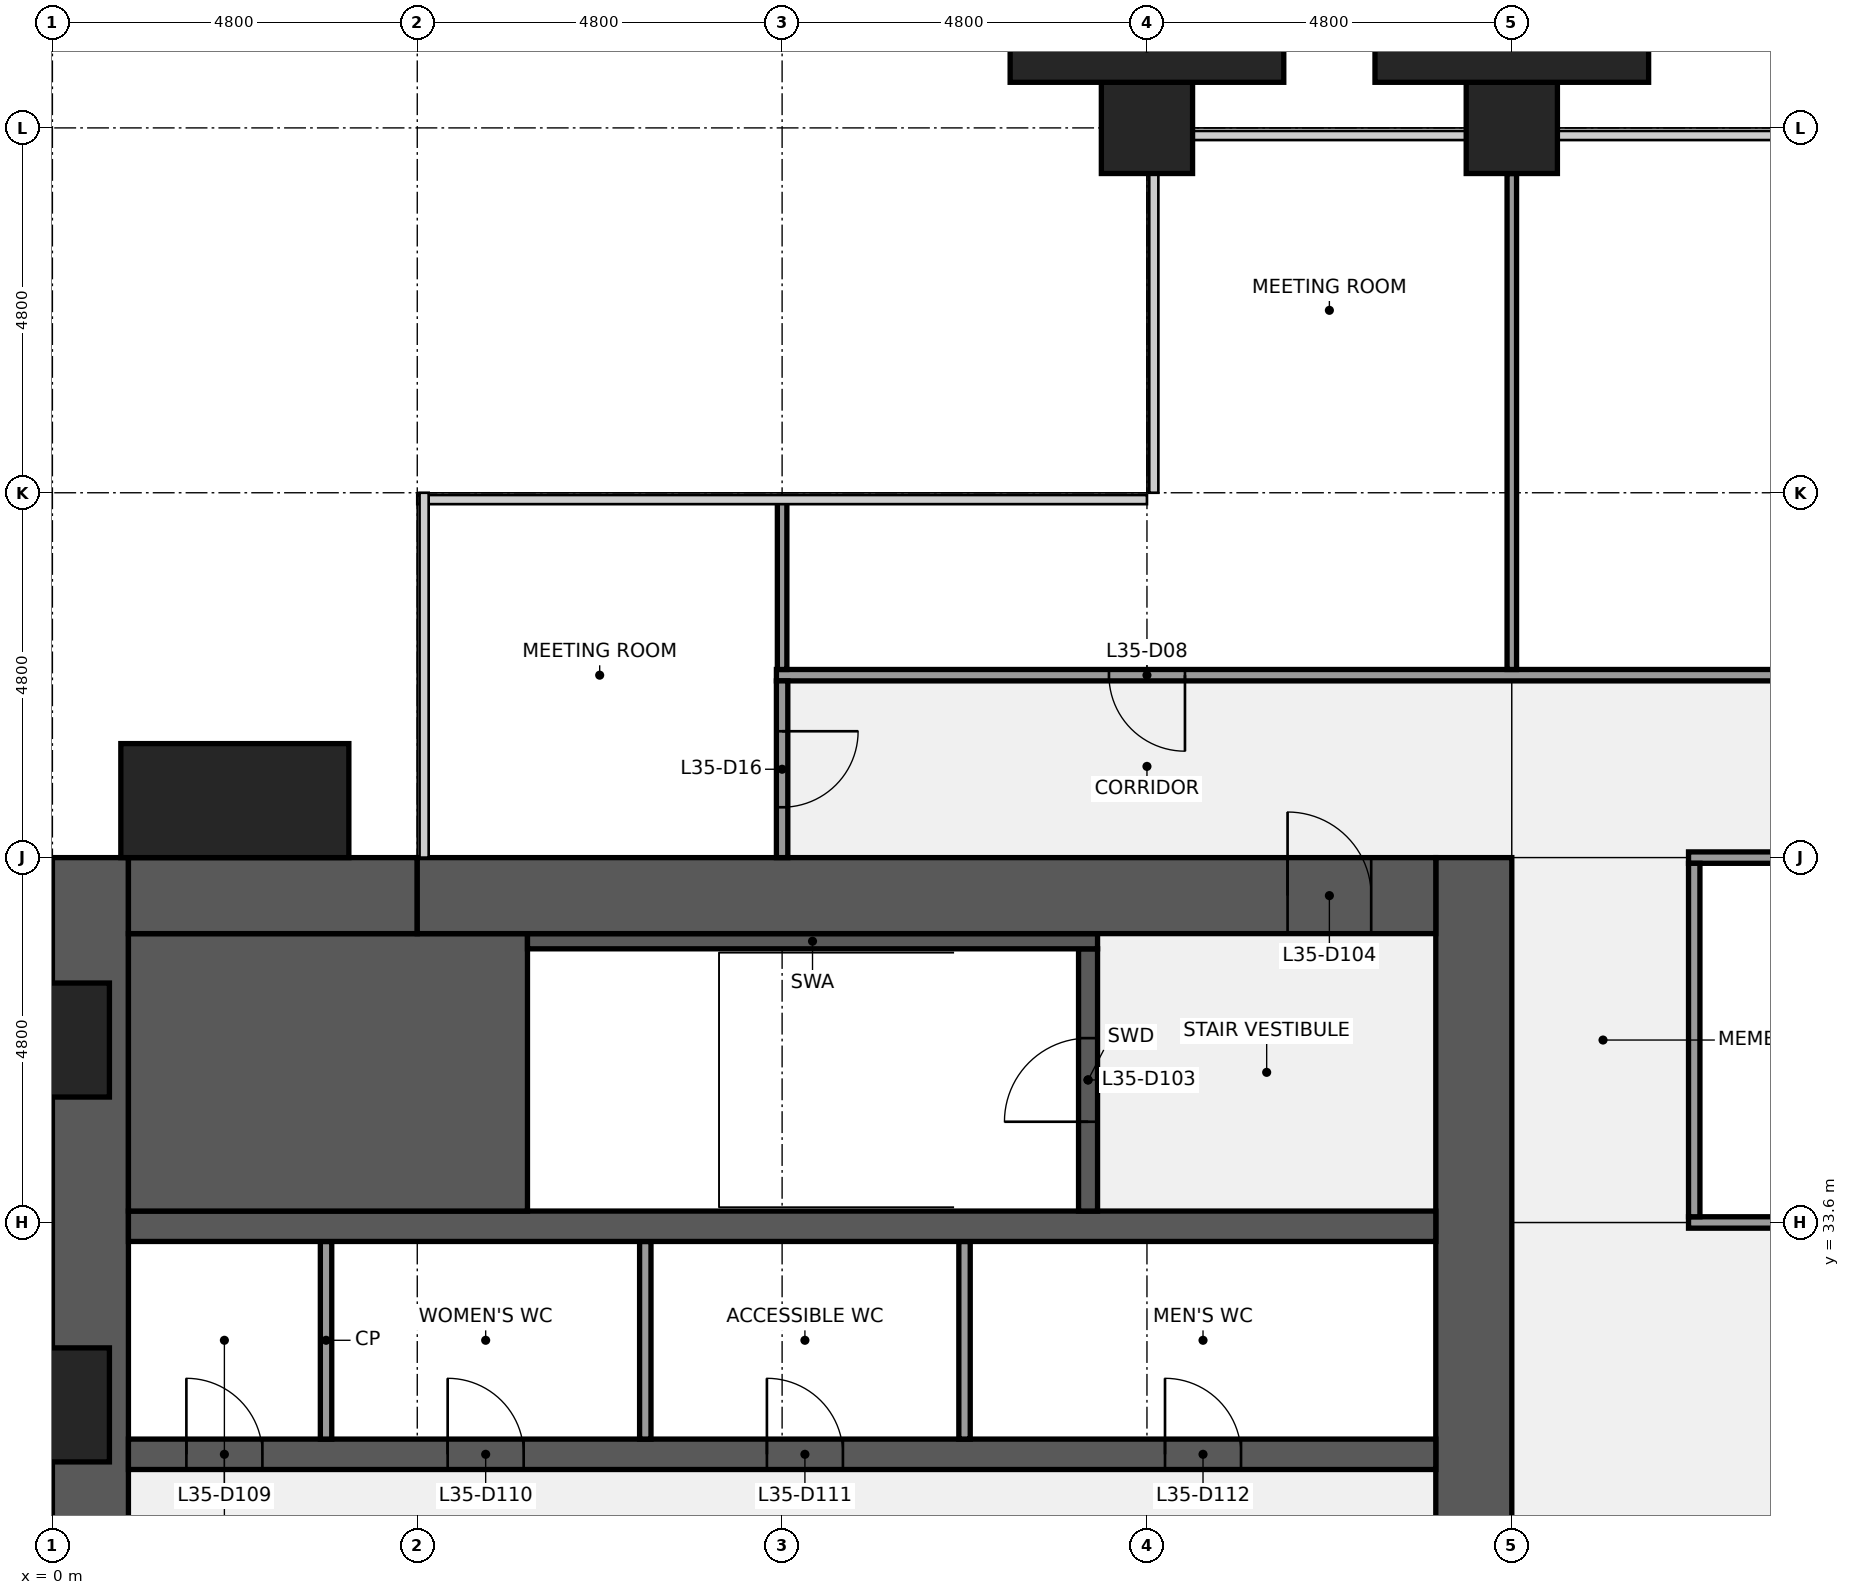
"""IFC4 building model, lengths in metres.
Left out: names, types, materials, properties, quantities, classifications, styles, units other than length and angle.
Written with IfcOpenShell. Run it as: python <this file> out.ifc"""

import sys

from ifc_helpers import new_model, si_unit, direction, frame, frame_2d, origin, origin_2d, place, context, subcontext, project, spatial, rectangle, extrude, element, fill, save


model = new_model("IFC4")
c1 = context("Model", 3, precision=1e-05, world=origin(), true_north=direction((0.0, 1.0)))
c2 = subcontext(c1, "Body", "Model", "MODEL_VIEW")
j1 = project(units=[si_unit("LENGTHUNIT", "METRE"), si_unit("PLANEANGLEUNIT", "RADIAN")], contexts=[c1])
p1 = place(None, origin())
s1 = spatial("IfcSite", under=j1, at=p1, CompositionType="ELEMENT")
p2 = place(p1, origin())
s2 = spatial("IfcBuilding", under=s1, at=p2, CompositionType="ELEMENT")
p3 = place(p2, frame((0.0, 0.0, 160.1)))
s3 = spatial("IfcBuildingStorey", under=s2, at=p3, CompositionType="ELEMENT", Elevation=160.1)
for number, where, z_axis, x_axis in (
    (1, (14.4, 48.0, 0.0), (0.0, 0.0, 1.0), (1.0, 0.0, 0.0)),
    (2, (19.2, 48.0, 0.0), (0.0, 0.0, 1.0), (1.0, 0.0, 0.0)),
):
    element("IfcColumn", number, at=place(p3, frame(where, z_axis=z_axis, x_axis=x_axis)), inside=s3, PredefinedType="COLUMN", context=c2, shape_type="SweptSolid", body=[
        extrude(rectangle(XDim=1.2, YDim=1.2, at=origin_2d()), origin(), (0.0, 0.0, 1.0), 4.0),
    ])
p4 = place(p3, frame((0.5, 9.6, 0.0), z_axis=(0.0, 0.0, 1.0), x_axis=(0.0, 1.0, 0.0)))
e3 = element("IfcWall", 3, at=p4, inside=s3, PredefinedType="SHEAR", context=c2, shape_type="SweptSolid", body=[
    extrude(rectangle(XDim=28.8, YDim=1.0, at=frame_2d((14.4, 0.0))), origin(), (0.0, 0.0, 1.0), 3.84),
])
p5 = place(p4, frame((8.85, 0.0, 0.9)))
e4 = element("IfcOpeningElement", 4, at=p5, cuts=e3, PredefinedType="OPENING", context=c2, shape_type="SweptSolid", body=[
    extrude(rectangle(XDim=1.5, YDim=1.5, at=frame_2d((0.75, 0.75))), frame((0.0, 0.51, 0.0), z_axis=(0.0, -1.0, 0.0), x_axis=(1.0, 0.0, 0.0)), (0.0, 0.0, 1.0), 1.02),
])
p6 = place(p4, frame((18.45, 0.0, 0.9)))
e5 = element("IfcOpeningElement", 5, at=p6, cuts=e3, PredefinedType="OPENING", context=c2, shape_type="SweptSolid", body=[
    extrude(rectangle(XDim=1.5, YDim=1.5, at=frame_2d((0.75, 0.75))), frame((0.0, 0.51, 0.0), z_axis=(0.0, -1.0, 0.0), x_axis=(1.0, 0.0, 0.0)), (0.0, 0.0, 1.0), 1.02),
])
p7 = place(p3, frame((18.7, 38.4, 0.0), z_axis=(0.0, 0.0, 1.0), x_axis=(0.0, -1.0, 0.0)))
e6 = element("IfcWall", 6, at=p7, inside=s3, PredefinedType="SHEAR", context=c2, shape_type="SweptSolid", body=[
    extrude(rectangle(XDim=28.8, YDim=1.0, at=frame_2d((14.4, 0.0))), origin(), (0.0, 0.0, 1.0), 3.84),
])
p8 = place(p7, frame((18.3, 0.0, 0.0)))
e7 = element("IfcOpeningElement", 7, at=p8, cuts=e6, PredefinedType="OPENING", context=c2, shape_type="SweptSolid", body=[
    extrude(rectangle(XDim=1.8, YDim=2.1, at=frame_2d((0.9, 1.05))), frame((0.0, 0.51, 0.0), z_axis=(0.0, -1.0, 0.0), x_axis=(1.0, 0.0, 0.0)), (0.0, 0.0, 1.0), 1.02),
])
p9 = place(p7, frame((8.7, 0.0, 0.0)))
e8 = element("IfcOpeningElement", 8, at=p9, cuts=e6, PredefinedType="OPENING", context=c2, shape_type="SweptSolid", body=[
    extrude(rectangle(XDim=1.8, YDim=2.1, at=frame_2d((0.9, 1.05))), frame((0.0, 0.51, 0.0), z_axis=(0.0, -1.0, 0.0), x_axis=(1.0, 0.0, 0.0)), (0.0, 0.0, 1.0), 1.02),
])
p10 = place(p3, frame((1.0, 30.55, 0.0), z_axis=(0.0, 0.0, 1.0), x_axis=(1.0, 0.0, 0.0)))
e9 = element("IfcWall", 9, at=p10, inside=s3, PredefinedType="SHEAR", context=c2, shape_type="SweptSolid", body=[
    extrude(rectangle(XDim=17.2, YDim=0.4, at=frame_2d((8.6, 0.0))), origin(), (0.0, 0.0, 1.0), 3.84),
])
p11 = place(p10, frame((0.762, 0.0, 0.0)))
e10 = element("IfcOpeningElement", 10, at=p11, cuts=e9, PredefinedType="OPENING", context=c2, shape_type="SweptSolid", body=[
    extrude(rectangle(XDim=1.0, YDim=2.1, at=frame_2d((0.5, 1.05))), frame((0.0, 0.21, 0.0), z_axis=(0.0, -1.0, 0.0), x_axis=(1.0, 0.0, 0.0)), (0.0, 0.0, 1.0), 0.42),
])
p12 = place(p10, frame((4.2, 0.0, 0.0)))
e11 = element("IfcOpeningElement", 11, at=p12, cuts=e9, PredefinedType="OPENING", context=c2, shape_type="SweptSolid", body=[
    extrude(rectangle(XDim=1.0, YDim=2.1, at=frame_2d((0.5, 1.05))), frame((0.0, 0.21, 0.0), z_axis=(0.0, -1.0, 0.0), x_axis=(1.0, 0.0, 0.0)), (0.0, 0.0, 1.0), 0.42),
])
p13 = place(p10, frame((8.4, 0.0, 0.0)))
e12 = element("IfcOpeningElement", 12, at=p13, cuts=e9, PredefinedType="OPENING", context=c2, shape_type="SweptSolid", body=[
    extrude(rectangle(XDim=1.0, YDim=2.1, at=frame_2d((0.5, 1.05))), frame((0.0, 0.21, 0.0), z_axis=(0.0, -1.0, 0.0), x_axis=(1.0, 0.0, 0.0)), (0.0, 0.0, 1.0), 0.42),
])
p14 = place(p10, frame((13.637, 0.0, 0.0)))
e13 = element("IfcOpeningElement", 13, at=p14, cuts=e9, PredefinedType="OPENING", context=c2, shape_type="SweptSolid", body=[
    extrude(rectangle(XDim=1.0, YDim=2.1, at=frame_2d((0.5, 1.05))), frame((0.0, 0.21, 0.0), z_axis=(0.0, -1.0, 0.0), x_axis=(1.0, 0.0, 0.0)), (0.0, 0.0, 1.0), 0.42),
])
for number, where, z_axis, x_axis in (
    (14, (3.6, 30.75, 0.0), (0.0, 0.0, 1.0), (0.0, 1.0, 0.0)),
    (15, (7.8, 30.75, 0.0), (0.0, 0.0, 1.0), (0.0, 1.0, 0.0)),
    (16, (12.0, 30.75, 0.0), (0.0, 0.0, 1.0), (0.0, 1.0, 0.0)),
):
    element("IfcWall", number, at=place(p3, frame(where, z_axis=z_axis, x_axis=x_axis)), inside=s3, PredefinedType="PARTITIONING", context=c2, shape_type="SweptSolid", body=[
        extrude(rectangle(XDim=2.6, YDim=0.15, at=frame_2d((1.3, 0.0))), origin(), (0.0, 0.0, 1.0), 3.84),
    ])
p15 = place(p3, frame((1.0, 33.55, 0.0), z_axis=(0.0, 0.0, 1.0), x_axis=(1.0, 0.0, 0.0)))
e17 = element("IfcWall", 17, at=p15, inside=s3, PredefinedType="SHEAR", context=c2, shape_type="SweptSolid", body=[
    extrude(rectangle(XDim=17.2, YDim=0.4, at=frame_2d((8.6, 0.0))), origin(), (0.0, 0.0, 1.0), 3.84),
])
p16 = place(p3, frame((1.0, 35.575, 0.0), z_axis=(0.0, 0.0, 1.0), x_axis=(1.0, 0.0, 0.0)))
e18 = element("IfcWall", 18, at=p16, inside=s3, PredefinedType="SHEAR", context=c2, shape_type="SweptSolid", body=[
    extrude(rectangle(XDim=5.25, YDim=3.65, at=frame_2d((2.625, 0.0))), origin(), (0.0, 0.0, 1.0), 3.84),
])
p17 = place(p3, frame((13.625, 33.75, 0.0), z_axis=(0.0, 0.0, 1.0), x_axis=(0.0, 1.0, 0.0)))
e19 = element("IfcWall", 19, at=p17, inside=s3, PredefinedType="SHEAR", context=c2, shape_type="SweptSolid", body=[
    extrude(rectangle(XDim=3.45, YDim=0.25, at=frame_2d((1.725, 0.0))), origin(), (0.0, 0.0, 1.0), 3.84),
])
p18 = place(p17, frame((1.175, 0.0, 0.0)))
e20 = element("IfcOpeningElement", 20, at=p18, cuts=e19, PredefinedType="OPENING", context=c2, shape_type="SweptSolid", body=[
    extrude(rectangle(XDim=1.1, YDim=2.1, at=frame_2d((0.55, 1.05))), frame((0.0, 0.135, 0.0), z_axis=(0.0, -1.0, 0.0), x_axis=(1.0, 0.0, 0.0)), (0.0, 0.0, 1.0), 0.27),
])
p19 = place(p3, frame((6.25, 37.3, 0.0), z_axis=(0.0, 0.0, 1.0), x_axis=(1.0, 0.0, 0.0)))
e21 = element("IfcWall", 21, at=p19, inside=s3, PredefinedType="SHEAR", context=c2, shape_type="SweptSolid", body=[
    extrude(rectangle(XDim=7.5, YDim=0.2, at=frame_2d((3.75, 0.0))), origin(), (0.0, 0.0, 1.0), 3.84),
])
p20 = place(p3, frame((1.0, 37.9, 0.0), z_axis=(0.0, 0.0, 1.0), x_axis=(1.0, 0.0, 0.0)))
e22 = element("IfcWall", 22, at=p20, inside=s3, PredefinedType="SHEAR", context=c2, shape_type="SweptSolid", body=[
    extrude(rectangle(XDim=3.8, YDim=1.0, at=frame_2d((1.9, 0.0))), origin(), (0.0, 0.0, 1.0), 3.84),
])
p21 = place(p3, frame((4.8, 37.9, 0.0), z_axis=(0.0, 0.0, 1.0), x_axis=(1.0, 0.0, 0.0)))
e23 = element("IfcWall", 23, at=p21, inside=s3, PredefinedType="SHEAR", context=c2, shape_type="SweptSolid", body=[
    extrude(rectangle(XDim=13.4, YDim=1.0, at=frame_2d((6.7, 0.0))), origin(), (0.0, 0.0, 1.0), 3.84),
])
p22 = place(p21, frame((11.45, 0.0, 0.0)))
e24 = element("IfcOpeningElement", 24, at=p22, cuts=e23, PredefinedType="OPENING", context=c2, shape_type="SweptSolid", body=[
    extrude(rectangle(XDim=1.1, YDim=2.1, at=frame_2d((0.55, 1.05))), frame((0.0, 0.51, 0.0), z_axis=(0.0, -1.0, 0.0), x_axis=(1.0, 0.0, 0.0)), (0.0, 0.0, 1.0), 1.02),
])
p23 = place(p3, frame((21.525, 33.6, 0.0), z_axis=(0.0, 0.0, 1.0), x_axis=(1.0, 0.0, 0.0)))
e25 = element("IfcWall", 25, at=p23, inside=s3, PredefinedType="PARTITIONING", context=c2, shape_type="SweptSolid", body=[
    extrude(rectangle(XDim=4.95, YDim=0.15, at=frame_2d((2.475, 0.0))), origin(), (0.0, 0.0, 1.0), 2.849),
])
p24 = place(p3, frame((21.525, 38.4, 0.0), z_axis=(0.0, 0.0, 1.0), x_axis=(1.0, 0.0, 0.0)))
e26 = element("IfcWall", 26, at=p24, inside=s3, PredefinedType="PARTITIONING", context=c2, shape_type="SweptSolid", body=[
    extrude(rectangle(XDim=14.55, YDim=0.15, at=frame_2d((7.275, 0.0))), origin(), (0.0, 0.0, 1.0), 2.849),
])
p25 = place(p24, frame((6.775, 0.0, 0.0)))
e27 = element("IfcOpeningElement", 27, at=p25, cuts=e26, PredefinedType="OPENING", context=c2, shape_type="SweptSolid", body=[
    extrude(rectangle(XDim=1.0, YDim=2.1, at=frame_2d((0.5, 1.05))), frame((0.0, 0.085, 0.0), z_axis=(0.0, -1.0, 0.0), x_axis=(1.0, 0.0, 0.0)), (0.0, 0.0, 1.0), 0.17),
])
p26 = place(p3, frame((9.525, 40.8, 0.0), z_axis=(0.0, 0.0, 1.0), x_axis=(1.0, 0.0, 0.0)))
e28 = element("IfcWall", 28, at=p26, inside=s3, PredefinedType="PARTITIONING", context=c2, shape_type="SweptSolid", body=[
    extrude(rectangle(XDim=38.375, YDim=0.15, at=frame_2d((19.188, 0.0))), origin(), (0.0, 0.0, 1.0), 2.849),
])
p27 = place(p26, frame((4.375, 0.0, 0.0)))
e29 = element("IfcOpeningElement", 29, at=p27, cuts=e28, PredefinedType="OPENING", context=c2, shape_type="SweptSolid", body=[
    extrude(rectangle(XDim=1.0, YDim=2.1, at=frame_2d((0.5, 1.05))), frame((0.0, 0.085, 0.0), z_axis=(0.0, -1.0, 0.0), x_axis=(1.0, 0.0, 0.0)), (0.0, 0.0, 1.0), 0.17),
])
p28 = place(p26, frame((13.975, 0.0, 0.0)))
e30 = element("IfcOpeningElement", 30, at=p28, cuts=e28, PredefinedType="OPENING", context=c2, shape_type="SweptSolid", body=[
    extrude(rectangle(XDim=1.0, YDim=2.1, at=frame_2d((0.5, 1.05))), frame((0.0, 0.085, 0.0), z_axis=(0.0, -1.0, 0.0), x_axis=(1.0, 0.0, 0.0)), (0.0, 0.0, 1.0), 0.17),
])
p29 = place(p26, frame((19.975, 0.0, 0.0)))
e31 = element("IfcOpeningElement", 31, at=p29, cuts=e28, PredefinedType="OPENING", context=c2, shape_type="SweptSolid", body=[
    extrude(rectangle(XDim=1.0, YDim=2.1, at=frame_2d((0.5, 1.05))), frame((0.0, 0.085, 0.0), z_axis=(0.0, -1.0, 0.0), x_axis=(1.0, 0.0, 0.0)), (0.0, 0.0, 1.0), 0.17),
])
p30 = place(p26, frame((24.775, 0.0, 0.0)))
e32 = element("IfcOpeningElement", 32, at=p30, cuts=e28, PredefinedType="OPENING", context=c2, shape_type="SweptSolid", body=[
    extrude(rectangle(XDim=1.0, YDim=2.1, at=frame_2d((0.5, 1.05))), frame((0.0, 0.085, 0.0), z_axis=(0.0, -1.0, 0.0), x_axis=(1.0, 0.0, 0.0)), (0.0, 0.0, 1.0), 0.17),
])
p31 = place(p26, frame((33.125, 0.0, 0.0)))
e33 = element("IfcOpeningElement", 33, at=p31, cuts=e28, PredefinedType="OPENING", context=c2, shape_type="SweptSolid", body=[
    extrude(rectangle(XDim=1.0, YDim=2.1, at=frame_2d((0.5, 1.05))), frame((0.0, 0.085, 0.0), z_axis=(0.0, -1.0, 0.0), x_axis=(1.0, 0.0, 0.0)), (0.0, 0.0, 1.0), 0.17),
])
p32 = place(p3, frame((9.6, 40.875, 0.0), z_axis=(0.0, 0.0, 1.0), x_axis=(0.0, 1.0, 0.0)))
e34 = element("IfcWall", 34, at=p32, inside=s3, PredefinedType="PARTITIONING", context=c2, shape_type="SweptSolid", body=[
    extrude(rectangle(XDim=2.225, YDim=0.125, at=frame_2d((1.113, 0.0))), origin(), (0.0, 0.0, 1.0), 2.849),
])
p33 = place(p3, frame((9.6, 38.4, 0.0), z_axis=(0.0, 0.0, 1.0), x_axis=(0.0, 1.0, 0.0)))
e35 = element("IfcWall", 35, at=p33, inside=s3, PredefinedType="PARTITIONING", context=c2, shape_type="SweptSolid", body=[
    extrude(rectangle(XDim=2.325, YDim=0.15, at=frame_2d((1.163, 0.0))), origin(), (0.0, 0.0, 1.0), 2.849),
])
p34 = place(p33, frame((0.663, 0.0, 0.0)))
e36 = element("IfcOpeningElement", 36, at=p34, cuts=e35, PredefinedType="OPENING", context=c2, shape_type="SweptSolid", body=[
    extrude(rectangle(XDim=1.0, YDim=2.1, at=frame_2d((0.5, 1.05))), frame((0.0, 0.085, 0.0), z_axis=(0.0, -1.0, 0.0), x_axis=(1.0, 0.0, 0.0)), (0.0, 0.0, 1.0), 0.17),
])
p35 = place(p3, frame((19.2, 40.875, 0.0), z_axis=(0.0, 0.0, 1.0), x_axis=(0.0, 1.0, 0.0)))
e37 = element("IfcWall", 37, at=p35, inside=s3, PredefinedType="PARTITIONING", context=c2, shape_type="SweptSolid", body=[
    extrude(rectangle(XDim=6.525, YDim=0.125, at=frame_2d((3.262, 0.0))), origin(), (0.0, 0.0, 1.0), 2.849),
])
p36 = place(p3, frame((21.6, 33.675, 0.0), z_axis=(0.0, 0.0, 1.0), x_axis=(0.0, 1.0, 0.0)))
e38 = element("IfcWall", 38, at=p36, inside=s3, PredefinedType="PARTITIONING", context=c2, shape_type="SweptSolid", body=[
    extrude(rectangle(XDim=4.65, YDim=0.15, at=frame_2d((2.325, 0.0))), origin(), (0.0, 0.0, 1.0), 2.849),
])
p37 = place(p3, frame((2.4, 39.15, 0.0), z_axis=(0.0, 0.0, 1.0), x_axis=(1.0, 0.0, 0.0)))
e39 = element("IfcColumn", 39, at=p37, inside=s3, PredefinedType="PILASTER", context=c2, shape_type="SweptSolid", body=[
    extrude(rectangle(XDim=3.0, YDim=1.5, at=origin_2d()), origin(), (0.0, 0.0, 1.0), 4.0),
])
for number, where, z_axis, x_axis in (
    (40, (14.4, 49.05, 0.0), (0.0, 0.0, 1.0), (1.0, 0.0, 0.0)),
    (41, (19.2, 49.05, 0.0), (0.0, 0.0, 1.0), (1.0, 0.0, 0.0)),
):
    element("IfcColumn", number, at=place(p3, frame(where, z_axis=z_axis, x_axis=x_axis)), inside=s3, PredefinedType="PILASTER", context=c2, shape_type="SweptSolid", body=[
        extrude(rectangle(XDim=3.6, YDim=0.9, at=origin_2d()), origin(), (0.0, 0.0, 1.0), 4.0),
    ])
p38 = place(p18, origin())
e42 = element("IfcDoor", 42, at=p38, inside=s3, OperationType="SINGLE_SWING_LEFT", PredefinedType="DOOR", context=c2, shape_type="SweptSolid", body=[
    extrude(rectangle(XDim=1.1, YDim=2.1, at=frame_2d((0.55, 1.05))), frame((0.0, 0.025, 0.0), z_axis=(0.0, -1.0, 0.0), x_axis=(1.0, 0.0, 0.0)), (0.0, 0.0, 1.0), 0.05),
])
fill(e20, e42)
p39 = place(p22, origin())
e43 = element("IfcDoor", 43, at=p39, inside=s3, OperationType="SINGLE_SWING_LEFT", PredefinedType="DOOR", context=c2, shape_type="SweptSolid", body=[
    extrude(rectangle(XDim=1.1, YDim=2.1, at=frame_2d((0.55, 1.05))), frame((0.0, 0.025, 0.0), z_axis=(0.0, -1.0, 0.0), x_axis=(1.0, 0.0, 0.0)), (0.0, 0.0, 1.0), 0.05),
])
fill(e24, e43)
p40 = place(p11, origin())
e44 = element("IfcDoor", 44, at=p40, inside=s3, OperationType="SINGLE_SWING_LEFT", PredefinedType="DOOR", context=c2, shape_type="SweptSolid", body=[
    extrude(rectangle(XDim=1.0, YDim=2.1, at=frame_2d((0.5, 1.05))), frame((0.0, 0.025, 0.0), z_axis=(0.0, -1.0, 0.0), x_axis=(1.0, 0.0, 0.0)), (0.0, 0.0, 1.0), 0.05),
])
fill(e10, e44)
p41 = place(p12, origin())
e45 = element("IfcDoor", 45, at=p41, inside=s3, OperationType="SINGLE_SWING_LEFT", PredefinedType="DOOR", context=c2, shape_type="SweptSolid", body=[
    extrude(rectangle(XDim=1.0, YDim=2.1, at=frame_2d((0.5, 1.05))), frame((0.0, 0.025, 0.0), z_axis=(0.0, -1.0, 0.0), x_axis=(1.0, 0.0, 0.0)), (0.0, 0.0, 1.0), 0.05),
])
fill(e11, e45)
p42 = place(p13, origin())
e46 = element("IfcDoor", 46, at=p42, inside=s3, OperationType="SINGLE_SWING_LEFT", PredefinedType="DOOR", context=c2, shape_type="SweptSolid", body=[
    extrude(rectangle(XDim=1.0, YDim=2.1, at=frame_2d((0.5, 1.05))), frame((0.0, 0.025, 0.0), z_axis=(0.0, -1.0, 0.0), x_axis=(1.0, 0.0, 0.0)), (0.0, 0.0, 1.0), 0.05),
])
fill(e12, e46)
p43 = place(p14, origin())
e47 = element("IfcDoor", 47, at=p43, inside=s3, OperationType="SINGLE_SWING_LEFT", PredefinedType="DOOR", context=c2, shape_type="SweptSolid", body=[
    extrude(rectangle(XDim=1.0, YDim=2.1, at=frame_2d((0.5, 1.05))), frame((0.0, 0.025, 0.0), z_axis=(0.0, -1.0, 0.0), x_axis=(1.0, 0.0, 0.0)), (0.0, 0.0, 1.0), 0.05),
])
fill(e13, e47)
p44 = place(p27, origin())
e48 = element("IfcDoor", 48, at=p44, inside=s3, OperationType="SINGLE_SWING_RIGHT", PredefinedType="DOOR", context=c2, shape_type="SweptSolid", body=[
    extrude(rectangle(XDim=1.0, YDim=2.1, at=frame_2d((0.5, 1.05))), frame((0.0, 0.025, 0.0), z_axis=(0.0, -1.0, 0.0), x_axis=(1.0, 0.0, 0.0)), (0.0, 0.0, 1.0), 0.05),
])
fill(e29, e48)
p45 = place(p34, origin())
e49 = element("IfcDoor", 49, at=p45, inside=s3, OperationType="SINGLE_SWING_RIGHT", PredefinedType="DOOR", context=c2, shape_type="SweptSolid", body=[
    extrude(rectangle(XDim=1.0, YDim=2.1, at=frame_2d((0.5, 1.05))), frame((0.0, 0.025, 0.0), z_axis=(0.0, -1.0, 0.0), x_axis=(1.0, 0.0, 0.0)), (0.0, 0.0, 1.0), 0.05),
])
fill(e36, e49)
save(model, sys.argv[1])
